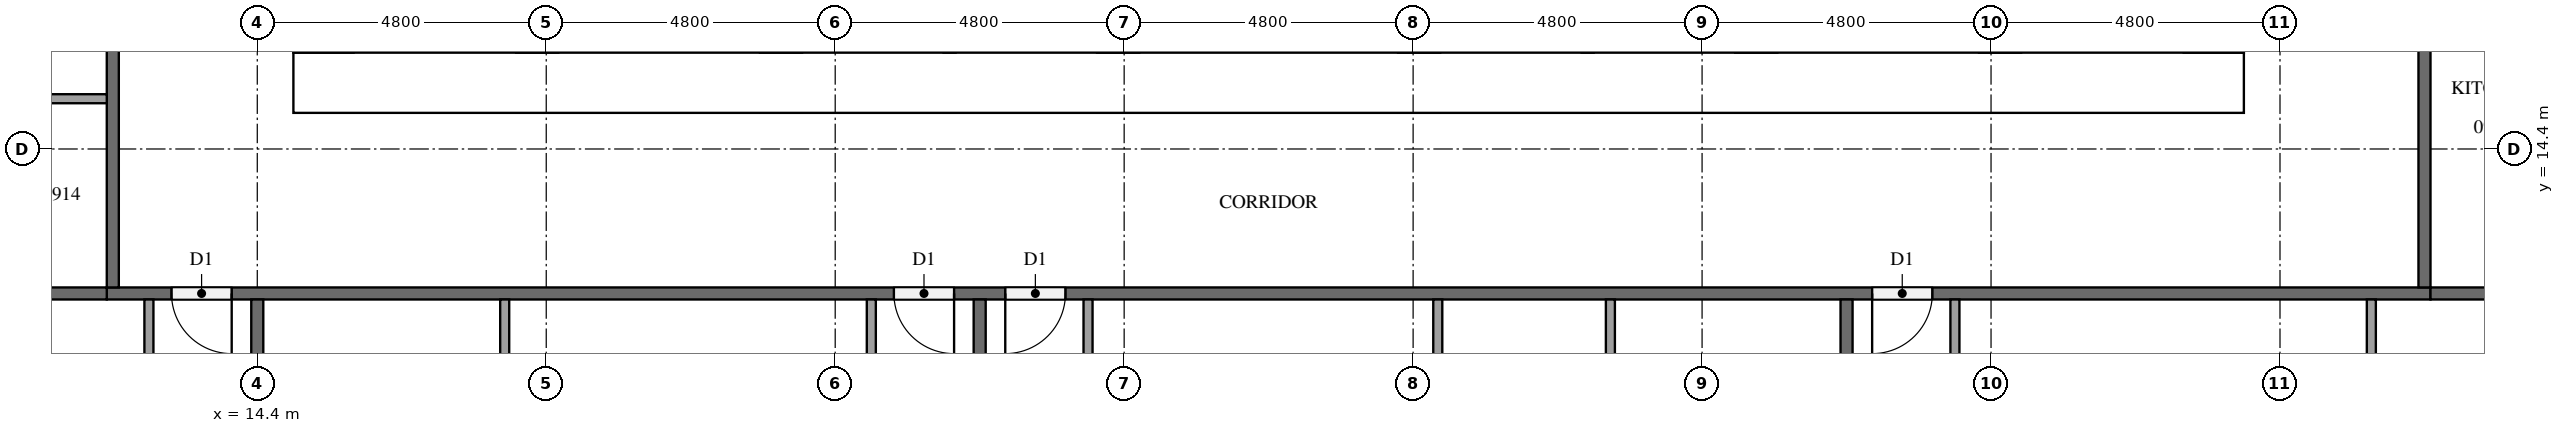
"""IFC4 building model, lengths in metres.
Left out: names, types, materials, properties, quantities, classifications, styles, units other than length and angle.
Written with IfcOpenShell. Run it as: python <this file> out.ifc"""

import sys

from ifc_helpers import new_model, si_unit, direction, frame, frame_2d, origin, place, context, subcontext, project, spatial, rectangle, extrude, element, fill, save


model = new_model("IFC4")
c1 = context("Model", 3, precision=1e-05, world=origin(), true_north=direction((0.0, 1.0)))
c2 = subcontext(c1, "Body", "Model", "MODEL_VIEW")
j1 = project(units=[si_unit("LENGTHUNIT", "METRE"), si_unit("PLANEANGLEUNIT", "RADIAN")], contexts=[c1])
p1 = place(None, origin())
s1 = spatial("IfcSite", under=j1, at=p1, CompositionType="ELEMENT")
p2 = place(p1, origin())
s2 = spatial("IfcBuilding", under=s1, at=p2, CompositionType="ELEMENT")
p3 = place(p2, frame((0.0, 0.0, 39.9)))
s3 = spatial("IfcBuildingStorey", under=s2, at=p3, CompositionType="ELEMENT", Elevation=39.9)
p4 = place(p3, frame((15.0, 15.5, 0.0), z_axis=(0.0, 0.0, 1.0), x_axis=(1.0, 0.0, 0.0)))
e1 = element("IfcWall", 1, at=p4, inside=s3, PredefinedType="SHEAR", context=c2, shape_type="SweptSolid", body=[
    extrude(rectangle(XDim=32.4, YDim=1.0, at=frame_2d((16.2, 0.0))), origin(), (0.0, 0.0, 1.0), 3.2),
])
p5 = place(p4, frame((15.3, 0.0, 0.0)))
e2 = element("IfcOpeningElement", 2, at=p5, cuts=e1, PredefinedType="OPENING", context=c2, shape_type="SweptSolid", body=[
    extrude(rectangle(XDim=1.8, YDim=2.1, at=frame_2d((0.9, 1.05))), frame((0.0, 0.51, 0.0), z_axis=(0.0, -1.0, 0.0), x_axis=(1.0, 0.0, 0.0)), (0.0, 0.0, 1.0), 1.02),
])
p6 = place(p3, frame((15.5, 16.0, 0.0), z_axis=(0.0, 0.0, 1.0), x_axis=(0.0, 1.0, 0.0)))
e3 = element("IfcWall", 3, at=p6, inside=s3, PredefinedType="SHEAR", context=c2, shape_type="SweptSolid", body=[
    extrude(rectangle(XDim=20.8, YDim=1.0, at=frame_2d((10.4, 0.0))), origin(), (0.0, 0.0, 1.0), 3.2),
])
p7 = place(p6, frame((4.76, 0.0, 0.0)))
e4 = element("IfcOpeningElement", 4, at=p7, cuts=e3, PredefinedType="OPENING", context=c2, shape_type="SweptSolid", body=[
    extrude(rectangle(XDim=1.2, YDim=2.1, at=frame_2d((0.6, 1.05))), frame((0.0, 0.51, 0.0), z_axis=(0.0, -1.0, 0.0), x_axis=(1.0, 0.0, 0.0)), (0.0, 0.0, 1.0), 1.02),
])
p8 = place(p3, frame((46.9, 16.0, 0.0), z_axis=(0.0, 0.0, 1.0), x_axis=(0.0, 1.0, 0.0)))
e5 = element("IfcWall", 5, at=p8, inside=s3, PredefinedType="SHEAR", context=c2, shape_type="SweptSolid", body=[
    extrude(rectangle(XDim=20.8, YDim=1.0, at=frame_2d((10.4, 0.0))), origin(), (0.0, 0.0, 1.0), 3.2),
])
p9 = place(p8, frame((10.1, 0.0, 0.0)))
e6 = element("IfcOpeningElement", 6, at=p9, cuts=e5, PredefinedType="OPENING", context=c2, shape_type="SweptSolid", body=[
    extrude(rectangle(XDim=1.2, YDim=2.1, at=frame_2d((0.6, 1.05))), frame((0.0, 0.51, 0.0), z_axis=(0.0, -1.0, 0.0), x_axis=(1.0, 0.0, 0.0)), (0.0, 0.0, 1.0), 1.02),
])
p10 = place(p3, frame((23.1, 16.0, 0.0), z_axis=(0.0, 0.0, 1.0), x_axis=(0.0, 1.0, 0.0)))
e7 = element("IfcWall", 7, at=p10, inside=s3, PredefinedType="SHEAR", context=c2, shape_type="SweptSolid", body=[
    extrude(rectangle(XDim=20.8, YDim=0.7, at=frame_2d((10.4, 0.0))), origin(), (0.0, 0.0, 1.0), 3.2),
])
p11 = place(p3, frame((50.5, 12.0, 0.0), z_axis=(0.0, 0.0, 1.0), x_axis=(-1.0, 0.0, 0.0)))
e8 = element("IfcWall", 8, at=p11, inside=s3, PredefinedType="PARTITIONING", context=c2, shape_type="SweptSolid", body=[
    extrude(rectangle(XDim=38.6, YDim=0.2, at=frame_2d((19.3, 0.0))), origin(), (0.0, 0.0, 1.0), 3.2),
])
p12 = place(p11, frame((36.525, 0.0, 0.0)))
e9 = element("IfcOpeningElement", 9, at=p12, cuts=e8, PredefinedType="OPENING", context=c2, shape_type="SweptSolid", body=[
    extrude(rectangle(XDim=1.0, YDim=2.1, at=frame_2d((0.5, 1.05))), frame((0.0, 0.11, 0.0), z_axis=(0.0, -1.0, 0.0), x_axis=(1.0, 0.0, 0.0)), (0.0, 0.0, 1.0), 0.22),
])
p13 = place(p11, frame((24.525, 0.0, 0.0)))
e10 = element("IfcOpeningElement", 10, at=p13, cuts=e8, PredefinedType="OPENING", context=c2, shape_type="SweptSolid", body=[
    extrude(rectangle(XDim=1.0, YDim=2.1, at=frame_2d((0.5, 1.05))), frame((0.0, 0.11, 0.0), z_axis=(0.0, -1.0, 0.0), x_axis=(1.0, 0.0, 0.0)), (0.0, 0.0, 1.0), 0.22),
])
p14 = place(p11, frame((22.675, 0.0, 0.0)))
e11 = element("IfcOpeningElement", 11, at=p14, cuts=e8, PredefinedType="OPENING", context=c2, shape_type="SweptSolid", body=[
    extrude(rectangle(XDim=1.0, YDim=2.1, at=frame_2d((0.5, 1.05))), frame((0.0, 0.11, 0.0), z_axis=(0.0, -1.0, 0.0), x_axis=(1.0, 0.0, 0.0)), (0.0, 0.0, 1.0), 0.22),
])
p15 = place(p11, frame((8.275, 0.0, 0.0)))
e12 = element("IfcOpeningElement", 12, at=p15, cuts=e8, PredefinedType="OPENING", context=c2, shape_type="SweptSolid", body=[
    extrude(rectangle(XDim=1.0, YDim=2.1, at=frame_2d((0.5, 1.05))), frame((0.0, 0.11, 0.0), z_axis=(0.0, -1.0, 0.0), x_axis=(1.0, 0.0, 0.0)), (0.0, 0.0, 1.0), 0.22),
])
p16 = place(p3, frame((50.4, 40.7, 0.0), z_axis=(0.0, 0.0, 1.0), x_axis=(0.0, -1.0, 0.0)))
e13 = element("IfcWall", 13, at=p16, inside=s3, PredefinedType="PARTITIONING", context=c2, shape_type="SweptSolid", body=[
    extrude(rectangle(XDim=28.6, YDim=0.2, at=frame_2d((14.3, 0.0))), origin(), (0.0, 0.0, 1.0), 3.2),
])
p17 = place(p16, frame((17.125, 0.0, 0.0)))
e14 = element("IfcOpeningElement", 14, at=p17, cuts=e13, PredefinedType="OPENING", context=c2, shape_type="SweptSolid", body=[
    extrude(rectangle(XDim=1.0, YDim=2.1, at=frame_2d((0.5, 1.05))), frame((0.0, 0.11, 0.0), z_axis=(0.0, -1.0, 0.0), x_axis=(1.0, 0.0, 0.0)), (0.0, 0.0, 1.0), 0.22),
])
p18 = place(p16, frame((15.275, 0.0, 0.0)))
e15 = element("IfcOpeningElement", 15, at=p18, cuts=e13, PredefinedType="OPENING", context=c2, shape_type="SweptSolid", body=[
    extrude(rectangle(XDim=1.0, YDim=2.1, at=frame_2d((0.5, 1.05))), frame((0.0, 0.11, 0.0), z_axis=(0.0, -1.0, 0.0), x_axis=(1.0, 0.0, 0.0)), (0.0, 0.0, 1.0), 0.22),
])
p19 = place(p16, frame((5.675, 0.0, 0.0)))
e16 = element("IfcOpeningElement", 16, at=p19, cuts=e13, PredefinedType="OPENING", context=c2, shape_type="SweptSolid", body=[
    extrude(rectangle(XDim=1.0, YDim=2.1, at=frame_2d((0.5, 1.05))), frame((0.0, 0.11, 0.0), z_axis=(0.0, -1.0, 0.0), x_axis=(1.0, 0.0, 0.0)), (0.0, 0.0, 1.0), 0.22),
])
p20 = place(p3, frame((12.0, 12.1, 0.0), z_axis=(0.0, 0.0, 1.0), x_axis=(0.0, 1.0, 0.0)))
e17 = element("IfcWall", 17, at=p20, inside=s3, PredefinedType="PARTITIONING", context=c2, shape_type="SweptSolid", body=[
    extrude(rectangle(XDim=28.6, YDim=0.2, at=frame_2d((14.3, 0.0))), origin(), (0.0, 0.0, 1.0), 3.2),
])
p21 = place(p20, frame((26.725, 0.0, 0.0)))
e18 = element("IfcOpeningElement", 18, at=p21, cuts=e17, PredefinedType="OPENING", context=c2, shape_type="SweptSolid", body=[
    extrude(rectangle(XDim=1.0, YDim=2.1, at=frame_2d((0.5, 1.05))), frame((0.0, 0.11, 0.0), z_axis=(0.0, -1.0, 0.0), x_axis=(1.0, 0.0, 0.0)), (0.0, 0.0, 1.0), 0.22),
])
p22 = place(p20, frame((17.125, 0.0, 0.0)))
e19 = element("IfcOpeningElement", 19, at=p22, cuts=e17, PredefinedType="OPENING", context=c2, shape_type="SweptSolid", body=[
    extrude(rectangle(XDim=1.0, YDim=2.1, at=frame_2d((0.5, 1.05))), frame((0.0, 0.11, 0.0), z_axis=(0.0, -1.0, 0.0), x_axis=(1.0, 0.0, 0.0)), (0.0, 0.0, 1.0), 0.22),
])
p23 = place(p20, frame((15.275, 0.0, 0.0)))
e20 = element("IfcOpeningElement", 20, at=p23, cuts=e17, PredefinedType="OPENING", context=c2, shape_type="SweptSolid", body=[
    extrude(rectangle(XDim=1.0, YDim=2.1, at=frame_2d((0.5, 1.05))), frame((0.0, 0.11, 0.0), z_axis=(0.0, -1.0, 0.0), x_axis=(1.0, 0.0, 0.0)), (0.0, 0.0, 1.0), 0.22),
])
p24 = place(p20, frame((5.675, 0.0, 0.0)))
e21 = element("IfcOpeningElement", 21, at=p24, cuts=e17, PredefinedType="OPENING", context=c2, shape_type="SweptSolid", body=[
    extrude(rectangle(XDim=1.0, YDim=2.1, at=frame_2d((0.5, 1.05))), frame((0.0, 0.11, 0.0), z_axis=(0.0, -1.0, 0.0), x_axis=(1.0, 0.0, 0.0)), (0.0, 0.0, 1.0), 0.22),
])
p25 = place(p3, frame((14.4, 11.9, 0.0), z_axis=(0.0, 0.0, 1.0), x_axis=(0.0, -1.0, 0.0)))
e22 = element("IfcWall", 22, at=p25, inside=s3, PredefinedType="PARTITIONING", context=c2, shape_type="SweptSolid", body=[
    extrude(rectangle(XDim=11.45, YDim=0.2, at=frame_2d((5.725, 0.0))), origin(), (0.0, 0.0, 1.0), 3.2),
])
for number, where, z_axis, x_axis in (
    (23, (0.1, 12.0, 0.0), (0.0, 0.0, 1.0), (1.0, 0.0, 0.0)),
    (24, (26.4, 11.9, 0.0), (0.0, 0.0, 1.0), (0.0, -1.0, 0.0)),
    (25, (40.8, 11.9, 0.0), (0.0, 0.0, 1.0), (0.0, -1.0, 0.0)),
):
    element("IfcWall", number, at=place(p3, frame(where, z_axis=z_axis, x_axis=x_axis)), inside=s3, PredefinedType="PARTITIONING", context=c2, shape_type="SweptSolid", body=[
        extrude(rectangle(XDim=11.8, YDim=0.2, at=frame_2d((5.9, 0.0))), origin(), (0.0, 0.0, 1.0), 3.2),
    ])
p26 = place(p3, frame((50.5, 12.0, 0.0), z_axis=(0.0, 0.0, 1.0), x_axis=(1.0, 0.0, 0.0)))
e26 = element("IfcWall", 26, at=p26, inside=s3, PredefinedType="PARTITIONING", context=c2, shape_type="SweptSolid", body=[
    extrude(rectangle(XDim=7.0, YDim=0.2, at=frame_2d((3.5, 0.0))), origin(), (0.0, 0.0, 1.0), 3.2),
])
p27 = place(p3, frame((12.6, 11.9, 0.0), z_axis=(0.0, 0.0, 1.0), x_axis=(0.0, -1.0, 0.0)))
e27 = element("IfcWall", 27, at=p27, inside=s3, PredefinedType="PARTITIONING", context=c2, shape_type="SweptSolid", body=[
    extrude(rectangle(XDim=3.875, YDim=0.15, at=frame_2d((1.938, 0.0))), origin(), (0.0, 0.0, 1.0), 3.2),
])
p28 = place(p3, frame((18.51, 11.9, 0.0), z_axis=(0.0, 0.0, 1.0), x_axis=(0.0, -1.0, 0.0)))
e28 = element("IfcWall", 28, at=p28, inside=s3, PredefinedType="PARTITIONING", context=c2, shape_type="SweptSolid", body=[
    extrude(rectangle(XDim=3.125, YDim=0.15, at=frame_2d((1.562, 0.0))), origin(), (0.0, 0.0, 1.0), 3.2),
])
p29 = place(p3, frame((24.6, 11.9, 0.0), z_axis=(0.0, 0.0, 1.0), x_axis=(0.0, -1.0, 0.0)))
e29 = element("IfcWall", 29, at=p29, inside=s3, PredefinedType="PARTITIONING", context=c2, shape_type="SweptSolid", body=[
    extrude(rectangle(XDim=3.275, YDim=0.15, at=frame_2d((1.637, 0.0))), origin(), (0.0, 0.0, 1.0), 3.2),
])
for number, where, z_axis, x_axis in (
    (30, (34.01, 11.9, 0.0), (0.0, 0.0, 1.0), (0.0, -1.0, 0.0)),
    (31, (36.877, 11.9, 0.0), (0.0, 0.0, 1.0), (0.0, -1.0, 0.0)),
):
    element("IfcWall", number, at=place(p3, frame(where, z_axis=z_axis, x_axis=x_axis)), inside=s3, PredefinedType="PARTITIONING", context=c2, shape_type="SweptSolid", body=[
        extrude(rectangle(XDim=3.575, YDim=0.15, at=frame_2d((1.788, 0.0))), origin(), (0.0, 0.0, 1.0), 3.2),
    ])
p30 = place(p3, frame((28.2, 11.9, 0.0), z_axis=(0.0, 0.0, 1.0), x_axis=(0.0, -1.0, 0.0)))
e32 = element("IfcWall", 32, at=p30, inside=s3, PredefinedType="PARTITIONING", context=c2, shape_type="SweptSolid", body=[
    extrude(rectangle(XDim=3.725, YDim=0.15, at=frame_2d((1.862, 0.0))), origin(), (0.0, 0.0, 1.0), 3.2),
])
p31 = place(p3, frame((49.517, 11.9, 0.0), z_axis=(0.0, 0.0, 1.0), x_axis=(0.0, -1.0, 0.0)))
e33 = element("IfcWall", 33, at=p31, inside=s3, PredefinedType="PARTITIONING", context=c2, shape_type="SweptSolid", body=[
    extrude(rectangle(XDim=3.875, YDim=0.15, at=frame_2d((1.938, 0.0))), origin(), (0.0, 0.0, 1.0), 3.2),
])
p32 = place(p3, frame((42.6, 11.9, 0.0), z_axis=(0.0, 0.0, 1.0), x_axis=(0.0, -1.0, 0.0)))
e34 = element("IfcWall", 34, at=p32, inside=s3, PredefinedType="PARTITIONING", context=c2, shape_type="SweptSolid", body=[
    extrude(rectangle(XDim=4.025, YDim=0.15, at=frame_2d((2.012, 0.0))), origin(), (0.0, 0.0, 1.0), 3.2),
])
p33 = place(p3, frame((11.9, 15.235, 0.0), z_axis=(0.0, 0.0, 1.0), x_axis=(-1.0, 0.0, 0.0)))
e35 = element("IfcWall", 35, at=p33, inside=s3, PredefinedType="PARTITIONING", context=c2, shape_type="SweptSolid", body=[
    extrude(rectangle(XDim=2.975, YDim=0.15, at=frame_2d((1.487, 0.0))), origin(), (0.0, 0.0, 1.0), 3.2),
])
p34 = place(p5, frame((1.8, 0.0, 0.0), z_axis=(0.0, 0.0, 1.0), x_axis=(-1.0, 0.0, 0.0)))
e36 = element("IfcDoor", 36, at=p34, inside=s3, OperationType="DOUBLE_DOOR_SINGLE_SWING", PredefinedType="DOOR", context=c2, shape_type="SweptSolid", body=[
    extrude(rectangle(XDim=1.8, YDim=2.1, at=frame_2d((0.9, 1.05))), frame((0.0, 0.025, 0.0), z_axis=(0.0, -1.0, 0.0), x_axis=(1.0, 0.0, 0.0)), (0.0, 0.0, 1.0), 0.05),
])
fill(e2, e36)
p35 = place(p12, origin())
e37 = element("IfcDoor", 37, at=p35, inside=s3, OperationType="SINGLE_SWING_LEFT", PredefinedType="DOOR", context=c2, shape_type="SweptSolid", body=[
    extrude(rectangle(XDim=1.0, YDim=2.1, at=frame_2d((0.5, 1.05))), frame((0.0, 0.025, 0.0), z_axis=(0.0, -1.0, 0.0), x_axis=(1.0, 0.0, 0.0)), (0.0, 0.0, 1.0), 0.05),
])
fill(e9, e37)
p36 = place(p13, origin())
e38 = element("IfcDoor", 38, at=p36, inside=s3, OperationType="SINGLE_SWING_LEFT", PredefinedType="DOOR", context=c2, shape_type="SweptSolid", body=[
    extrude(rectangle(XDim=1.0, YDim=2.1, at=frame_2d((0.5, 1.05))), frame((0.0, 0.025, 0.0), z_axis=(0.0, -1.0, 0.0), x_axis=(1.0, 0.0, 0.0)), (0.0, 0.0, 1.0), 0.05),
])
fill(e10, e38)
p37 = place(p14, origin())
e39 = element("IfcDoor", 39, at=p37, inside=s3, OperationType="SINGLE_SWING_RIGHT", PredefinedType="DOOR", context=c2, shape_type="SweptSolid", body=[
    extrude(rectangle(XDim=1.0, YDim=2.1, at=frame_2d((0.5, 1.05))), frame((0.0, 0.025, 0.0), z_axis=(0.0, -1.0, 0.0), x_axis=(1.0, 0.0, 0.0)), (0.0, 0.0, 1.0), 0.05),
])
fill(e11, e39)
p38 = place(p15, origin())
e40 = element("IfcDoor", 40, at=p38, inside=s3, OperationType="SINGLE_SWING_RIGHT", PredefinedType="DOOR", context=c2, shape_type="SweptSolid", body=[
    extrude(rectangle(XDim=1.0, YDim=2.1, at=frame_2d((0.5, 1.05))), frame((0.0, 0.025, 0.0), z_axis=(0.0, -1.0, 0.0), x_axis=(1.0, 0.0, 0.0)), (0.0, 0.0, 1.0), 0.05),
])
fill(e12, e40)
save(model, sys.argv[1])
